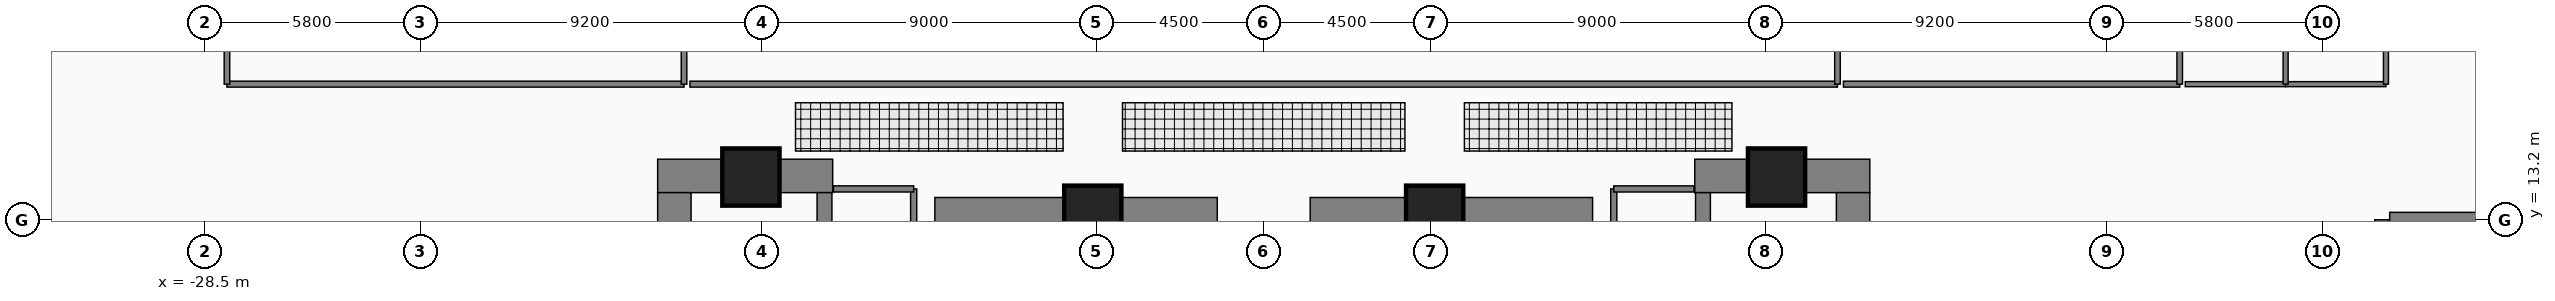
"""IFC4 building model, lengths in metres.
Left out: names, types, materials, properties, quantities, classifications, styles, units other than length and angle.
Written with IfcOpenShell. Run it as: python <this file> out.ifc"""

import sys

from ifc_helpers import new_model, si_unit, direction, frame, frame_2d, origin, origin_2d, place, context, subcontext, project, spatial, rectangle, extrude, element, fill, save


model = new_model("IFC4")
c1 = context("Model", 3, precision=1e-05, world=origin(), true_north=direction((0.0, 1.0)))
c2 = subcontext(c1, "Body", "Model", "MODEL_VIEW")
j1 = project(units=[si_unit("LENGTHUNIT", "METRE"), si_unit("PLANEANGLEUNIT", "RADIAN")], contexts=[c1])
p1 = place(None, origin())
s1 = spatial("IfcSite", under=j1, at=p1, CompositionType="ELEMENT")
p2 = place(p1, origin())
s2 = spatial("IfcBuilding", under=s1, at=p2, CompositionType="ELEMENT")
p3 = place(p2, origin())
s3 = spatial("IfcBuildingStorey", under=s2, at=p3, CompositionType="ELEMENT", Elevation=0.0)
for number, where, z_axis, x_axis in (
    (1, (-16.31, 14.38, 0.0), (0.0, 0.0, 1.0), (1.0, 0.0, 0.0)),
    (2, (11.6, 14.38, 0.0), (0.0, 0.0, 1.0), (1.0, 0.0, 0.0)),
):
    element("IfcWall", number, at=place(p3, frame(where, z_axis=z_axis, x_axis=x_axis)), inside=s3, PredefinedType="SHEAR", context=c2, shape_type="SweptSolid", body=[
        extrude(rectangle(XDim=4.71, YDim=0.9, at=frame_2d((2.355, 0.0))), origin(), (0.0, 0.0, 1.0), 5.81),
    ])
for number, where, z_axis, x_axis in (
    (3, (-15.86, 4.97, 0.0), (0.0, 0.0, 1.0), (0.0, 1.0, 0.0)),
    (4, (15.86, 4.97, 0.0), (0.0, 0.0, 1.0), (0.0, 1.0, 0.0)),
):
    element("IfcWall", number, at=place(p3, frame(where, z_axis=z_axis, x_axis=x_axis)), inside=s3, PredefinedType="SHEAR", context=c2, shape_type="SweptSolid", body=[
        extrude(rectangle(XDim=8.96, YDim=0.9, at=frame_2d((4.48, 0.0))), origin(), (0.0, 0.0, 1.0), 5.81),
    ])
for number, where, z_axis, x_axis in (
    (5, (-8.85, 13.35, 0.0), (0.0, 0.0, 1.0), (1.0, 0.0, 0.0)),
    (6, (1.25, 13.35, 0.0), (0.0, 0.0, 1.0), (1.0, 0.0, 0.0)),
):
    element("IfcWall", number, at=place(p3, frame(where, z_axis=z_axis, x_axis=x_axis)), inside=s3, PredefinedType="SHEAR", context=c2, shape_type="SweptSolid", body=[
        extrude(rectangle(XDim=7.6, YDim=0.9, at=frame_2d((3.8, 0.0))), origin(), (0.0, 0.0, 1.0), 5.75),
    ])
p4 = place(p3, frame((-11.82, 4.97, 0.0), z_axis=(0.0, 0.0, 1.0), x_axis=(0.0, 1.0, 0.0)))
e7 = element("IfcWall", 7, at=p4, inside=s3, PredefinedType="SHEAR", context=c2, shape_type="SweptSolid", body=[
    extrude(rectangle(XDim=8.96, YDim=0.4, at=frame_2d((4.48, 0.0))), origin(), (0.0, 0.0, 1.0), 5.81),
])
p5 = place(p4, frame((0.31, 0.0, 0.0)))
e8 = element("IfcOpeningElement", 8, at=p5, cuts=e7, PredefinedType="OPENING", context=c2, shape_type="SweptSolid", body=[
    extrude(rectangle(XDim=1.12, YDim=2.22, at=frame_2d((0.56, 1.11))), frame((0.0, 0.21, 0.0), z_axis=(0.0, -1.0, 0.0), x_axis=(1.0, 0.0, 0.0)), (0.0, 0.0, 1.0), 0.42),
])
p6 = place(p3, frame((11.82, 13.93, 0.0), z_axis=(0.0, 0.0, 1.0), x_axis=(0.0, -1.0, 0.0)))
e9 = element("IfcWall", 9, at=p6, inside=s3, PredefinedType="SHEAR", context=c2, shape_type="SweptSolid", body=[
    extrude(rectangle(XDim=8.96, YDim=0.4, at=frame_2d((4.48, 0.0))), origin(), (0.0, 0.0, 1.0), 5.81),
])
p7 = place(p6, frame((7.53, 0.0, 0.0)))
e10 = element("IfcOpeningElement", 10, at=p7, cuts=e9, PredefinedType="OPENING", context=c2, shape_type="SweptSolid", body=[
    extrude(rectangle(XDim=1.12, YDim=2.22, at=frame_2d((0.56, 1.11))), frame((0.0, 0.21, 0.0), z_axis=(0.0, -1.0, 0.0), x_axis=(1.0, 0.0, 0.0)), (0.0, 0.0, 1.0), 0.42),
])
p8 = place(p3, frame((30.1, 13.2, 0.0), z_axis=(0.0, 0.0, 1.0), x_axis=(0.0, -1.0, 0.0)))
e11 = element("IfcWall", 11, at=p8, inside=s3, PredefinedType="SHEAR", context=c2, shape_type="SweptSolid", body=[
    extrude(rectangle(XDim=11.8, YDim=0.4, at=frame_2d((5.9, 0.0))), origin(), (0.0, 0.0, 1.0), 5.81),
])
p9 = place(p8, frame((9.7, 0.0, 0.0)))
e12 = element("IfcOpeningElement", 12, at=p9, cuts=e11, PredefinedType="OPENING", context=c2, shape_type="SweptSolid", body=[
    extrude(rectangle(XDim=1.12, YDim=2.22, at=frame_2d((0.56, 1.11))), frame((0.0, 0.21, 0.0), z_axis=(0.0, -1.0, 0.0), x_axis=(1.0, 0.0, 0.0)), (0.0, 0.0, 1.0), 0.42),
])
p10 = place(p3, frame((30.3, 13.2, 0.0), z_axis=(0.0, 0.0, 1.0), x_axis=(1.0, 0.0, 0.0)))
e13 = element("IfcWall", 13, at=p10, inside=s3, PredefinedType="SHEAR", context=c2, shape_type="SweptSolid", body=[
    extrude(rectangle(XDim=5.35, YDim=0.4, at=frame_2d((2.675, 0.0))), origin(), (0.0, 0.0, 1.0), 5.81),
])
for number, where, z_axis, x_axis in (
    (14, (-13.8, 14.35, 0.0), (0.0, 0.0, 1.0), (1.0, 0.0, 0.0)),
    (15, (-4.6, 13.35, 0.0), (0.0, 0.0, 1.0), (1.0, 0.0, 0.0)),
    (16, (4.6, 13.35, 0.0), (0.0, 0.0, 1.0), (1.0, 0.0, 0.0)),
    (17, (13.8, 14.35, 0.0), (0.0, 0.0, 1.0), (1.0, 0.0, 0.0)),
):
    element("IfcColumn", number, at=place(p3, frame(where, z_axis=z_axis, x_axis=x_axis)), inside=s3, PredefinedType="COLUMN", context=c2, shape_type="SweptSolid", body=[
        extrude(rectangle(XDim=1.5, YDim=1.5, at=origin_2d()), origin(), (0.0, 0.0, 1.0), 6.0),
    ])
p11 = place(p3, frame((-27.9, 16.85, 0.0), z_axis=(0.0, 0.0, 1.0), x_axis=(1.0, 0.0, 0.0)))
e18 = element("IfcWall", 18, at=p11, inside=s3, PredefinedType="PARTITIONING", context=c2, shape_type="SweptSolid", body=[
    extrude(rectangle(XDim=12.3, YDim=0.16, at=frame_2d((6.15, 0.0))), origin(), (0.0, 0.0, 1.0), 5.75),
])
p12 = place(p11, frame((7.01, 0.0, 0.0)))
e19 = element("IfcOpeningElement", 19, at=p12, cuts=e18, PredefinedType="OPENING", context=c2, shape_type="SweptSolid", body=[
    extrude(rectangle(XDim=1.08, YDim=2.18, at=frame_2d((0.54, 1.09))), frame((0.0, 0.09, 0.0), z_axis=(0.0, -1.0, 0.0), x_axis=(1.0, 0.0, 0.0)), (0.0, 0.0, 1.0), 0.18),
])
p13 = place(p3, frame((-15.44, 16.85, 0.0), z_axis=(0.0, 0.0, 1.0), x_axis=(1.0, 0.0, 0.0)))
e20 = element("IfcWall", 20, at=p13, inside=s3, PredefinedType="PARTITIONING", context=c2, shape_type="SweptSolid", body=[
    extrude(rectangle(XDim=30.88, YDim=0.16, at=frame_2d((15.44, 0.0))), origin(), (0.0, 0.0, 1.0), 5.217),
])
p14 = place(p13, frame((14.9, 0.0, 0.0)))
e21 = element("IfcOpeningElement", 21, at=p14, cuts=e20, PredefinedType="OPENING", context=c2, shape_type="SweptSolid", body=[
    extrude(rectangle(XDim=1.08, YDim=2.18, at=frame_2d((0.54, 1.09))), frame((0.0, 0.09, 0.0), z_axis=(0.0, -1.0, 0.0), x_axis=(1.0, 0.0, 0.0)), (0.0, 0.0, 1.0), 0.18),
])
p15 = place(p3, frame((15.6, 16.85, 0.0), z_axis=(0.0, 0.0, 1.0), x_axis=(1.0, 0.0, 0.0)))
e22 = element("IfcWall", 22, at=p15, inside=s3, PredefinedType="PARTITIONING", context=c2, shape_type="SweptSolid", body=[
    extrude(rectangle(XDim=9.05, YDim=0.16, at=frame_2d((4.525, 0.0))), origin(), (0.0, 0.0, 1.0), 5.75),
])
p16 = place(p15, frame((3.985, 0.0, 0.0)))
e23 = element("IfcOpeningElement", 23, at=p16, cuts=e22, PredefinedType="OPENING", context=c2, shape_type="SweptSolid", body=[
    extrude(rectangle(XDim=1.08, YDim=2.18, at=frame_2d((0.54, 1.09))), frame((0.0, 0.09, 0.0), z_axis=(0.0, -1.0, 0.0), x_axis=(1.0, 0.0, 0.0)), (0.0, 0.0, 1.0), 0.18),
])
p17 = place(p3, frame((24.8, 16.85, 0.0), z_axis=(0.0, 0.0, 1.0), x_axis=(1.0, 0.0, 0.0)))
e24 = element("IfcWall", 24, at=p17, inside=s3, PredefinedType="PLUMBINGWALL", context=c2, shape_type="SweptSolid", body=[
    extrude(rectangle(XDim=2.7, YDim=0.135, at=frame_2d((1.35, 0.0))), origin(), (0.0, 0.0, 1.0), 5.75),
])
p18 = place(p17, frame((0.89, 0.0, 0.0)))
e25 = element("IfcOpeningElement", 25, at=p18, cuts=e24, PredefinedType="OPENING", context=c2, shape_type="SweptSolid", body=[
    extrude(rectangle(XDim=0.92, YDim=2.12, at=frame_2d((0.46, 1.06))), frame((0.0, 0.077, 0.0), z_axis=(0.0, -1.0, 0.0), x_axis=(1.0, 0.0, 0.0)), (0.0, 0.0, 1.0), 0.155),
])
p19 = place(p3, frame((27.5, 16.85, 0.0), z_axis=(0.0, 0.0, 1.0), x_axis=(1.0, 0.0, 0.0)))
e26 = element("IfcWall", 26, at=p19, inside=s3, PredefinedType="PLUMBINGWALL", context=c2, shape_type="SweptSolid", body=[
    extrude(rectangle(XDim=2.7, YDim=0.135, at=frame_2d((1.35, 0.0))), origin(), (0.0, 0.0, 1.0), 5.75),
])
p20 = place(p19, frame((0.89, 0.0, 0.0)))
e27 = element("IfcOpeningElement", 27, at=p20, cuts=e26, PredefinedType="OPENING", context=c2, shape_type="SweptSolid", body=[
    extrude(rectangle(XDim=0.92, YDim=2.12, at=frame_2d((0.46, 1.06))), frame((0.0, 0.077, 0.0), z_axis=(0.0, -1.0, 0.0), x_axis=(1.0, 0.0, 0.0)), (0.0, 0.0, 1.0), 0.155),
])
p21 = place(p3, frame((-9.42, 11.07, 0.0), z_axis=(0.0, 0.0, 1.0), x_axis=(0.0, 1.0, 0.0)))
e28 = element("IfcWall", 28, at=p21, inside=s3, PredefinedType="PARTITIONING", context=c2, shape_type="SweptSolid", body=[
    extrude(rectangle(XDim=2.96, YDim=0.165, at=frame_2d((1.48, 0.0))), origin(), (0.0, 0.0, 1.0), 5.75),
])
p22 = place(p3, frame((-11.58, 14.03, 0.0), z_axis=(0.0, 0.0, 1.0), x_axis=(1.0, 0.0, 0.0)))
e29 = element("IfcWall", 29, at=p22, inside=s3, PredefinedType="PARTITIONING", context=c2, shape_type="SweptSolid", body=[
    extrude(rectangle(XDim=2.16, YDim=0.165, at=frame_2d((1.08, 0.0))), origin(), (0.0, 0.0, 1.0), 5.75),
])
p23 = place(p3, frame((9.42, 11.07, 0.0), z_axis=(0.0, 0.0, 1.0), x_axis=(0.0, 1.0, 0.0)))
e30 = element("IfcWall", 30, at=p23, inside=s3, PredefinedType="PARTITIONING", context=c2, shape_type="SweptSolid", body=[
    extrude(rectangle(XDim=2.96, YDim=0.165, at=frame_2d((1.48, 0.0))), origin(), (0.0, 0.0, 1.0), 5.75),
])
p24 = place(p3, frame((9.42, 14.03, 0.0), z_axis=(0.0, 0.0, 1.0), x_axis=(1.0, 0.0, 0.0)))
e31 = element("IfcWall", 31, at=p24, inside=s3, PredefinedType="PARTITIONING", context=c2, shape_type="SweptSolid", body=[
    extrude(rectangle(XDim=2.16, YDim=0.165, at=frame_2d((1.08, 0.0))), origin(), (0.0, 0.0, 1.0), 5.75),
])
for number, where, z_axis, x_axis in (
    (32, (-27.9, 16.85, 0.0), (0.0, 0.0, 1.0), (0.0, 1.0, 0.0)),
    (33, (-15.6, 16.85, 0.0), (0.0, 0.0, 1.0), (0.0, 1.0, 0.0)),
    (34, (15.44, 16.85, 0.0), (0.0, 0.0, 1.0), (0.0, 1.0, 0.0)),
    (35, (24.65, 16.85, 0.0), (0.0, 0.0, 1.0), (0.0, 1.0, 0.0)),
):
    element("IfcWall", number, at=place(p3, frame(where, z_axis=z_axis, x_axis=x_axis)), inside=s3, PredefinedType="PARTITIONING", context=c2, shape_type="SweptSolid", body=[
        extrude(rectangle(XDim=8.09, YDim=0.15, at=frame_2d((4.045, 0.0))), origin(), (0.0, 0.0, 1.0), 5.75),
    ])
for number, where, z_axis, x_axis in (
    (36, (30.2, 16.85, 0.0), (0.0, 0.0, 1.0), (0.0, 1.0, 0.0)),
    (37, (27.5, 16.85, 0.0), (0.0, 0.0, 1.0), (0.0, 1.0, 0.0)),
):
    element("IfcWall", number, at=place(p3, frame(where, z_axis=z_axis, x_axis=x_axis)), inside=s3, PredefinedType="PLUMBINGWALL", context=c2, shape_type="SweptSolid", body=[
        extrude(rectangle(XDim=8.0, YDim=0.135, at=frame_2d((4.0, 0.0))), origin(), (0.0, 0.0, 1.0), 5.75),
    ])
p25 = place(p12, origin())
e38 = element("IfcDoor", 38, at=p25, inside=s3, OperationType="SINGLE_SWING_RIGHT", PredefinedType="DOOR", context=c2, shape_type="SweptSolid", body=[
    extrude(rectangle(XDim=1.08, YDim=2.18, at=frame_2d((0.54, 1.09))), frame((0.0, 0.025, 0.0), z_axis=(0.0, -1.0, 0.0), x_axis=(1.0, 0.0, 0.0)), (0.0, 0.0, 1.0), 0.05),
])
fill(e19, e38)
p26 = place(p14, origin())
e39 = element("IfcDoor", 39, at=p26, inside=s3, OperationType="SINGLE_SWING_LEFT", PredefinedType="DOOR", context=c2, shape_type="SweptSolid", body=[
    extrude(rectangle(XDim=1.08, YDim=2.18, at=frame_2d((0.54, 1.09))), frame((0.0, 0.025, 0.0), z_axis=(0.0, -1.0, 0.0), x_axis=(1.0, 0.0, 0.0)), (0.0, 0.0, 1.0), 0.05),
])
fill(e21, e39)
p27 = place(p16, origin())
e40 = element("IfcDoor", 40, at=p27, inside=s3, OperationType="SINGLE_SWING_RIGHT", PredefinedType="DOOR", context=c2, shape_type="SweptSolid", body=[
    extrude(rectangle(XDim=1.08, YDim=2.18, at=frame_2d((0.54, 1.09))), frame((0.0, 0.025, 0.0), z_axis=(0.0, -1.0, 0.0), x_axis=(1.0, 0.0, 0.0)), (0.0, 0.0, 1.0), 0.05),
])
fill(e23, e40)
p28 = place(p18, origin())
e41 = element("IfcDoor", 41, at=p28, inside=s3, OperationType="SINGLE_SWING_RIGHT", PredefinedType="DOOR", context=c2, shape_type="SweptSolid", body=[
    extrude(rectangle(XDim=0.92, YDim=2.12, at=frame_2d((0.46, 1.06))), frame((0.0, 0.025, 0.0), z_axis=(0.0, -1.0, 0.0), x_axis=(1.0, 0.0, 0.0)), (0.0, 0.0, 1.0), 0.05),
])
fill(e25, e41)
p29 = place(p20, origin())
e42 = element("IfcDoor", 42, at=p29, inside=s3, OperationType="SINGLE_SWING_LEFT", PredefinedType="DOOR", context=c2, shape_type="SweptSolid", body=[
    extrude(rectangle(XDim=0.92, YDim=2.12, at=frame_2d((0.46, 1.06))), frame((0.0, 0.025, 0.0), z_axis=(0.0, -1.0, 0.0), x_axis=(1.0, 0.0, 0.0)), (0.0, 0.0, 1.0), 0.05),
])
fill(e27, e42)
save(model, sys.argv[1])
